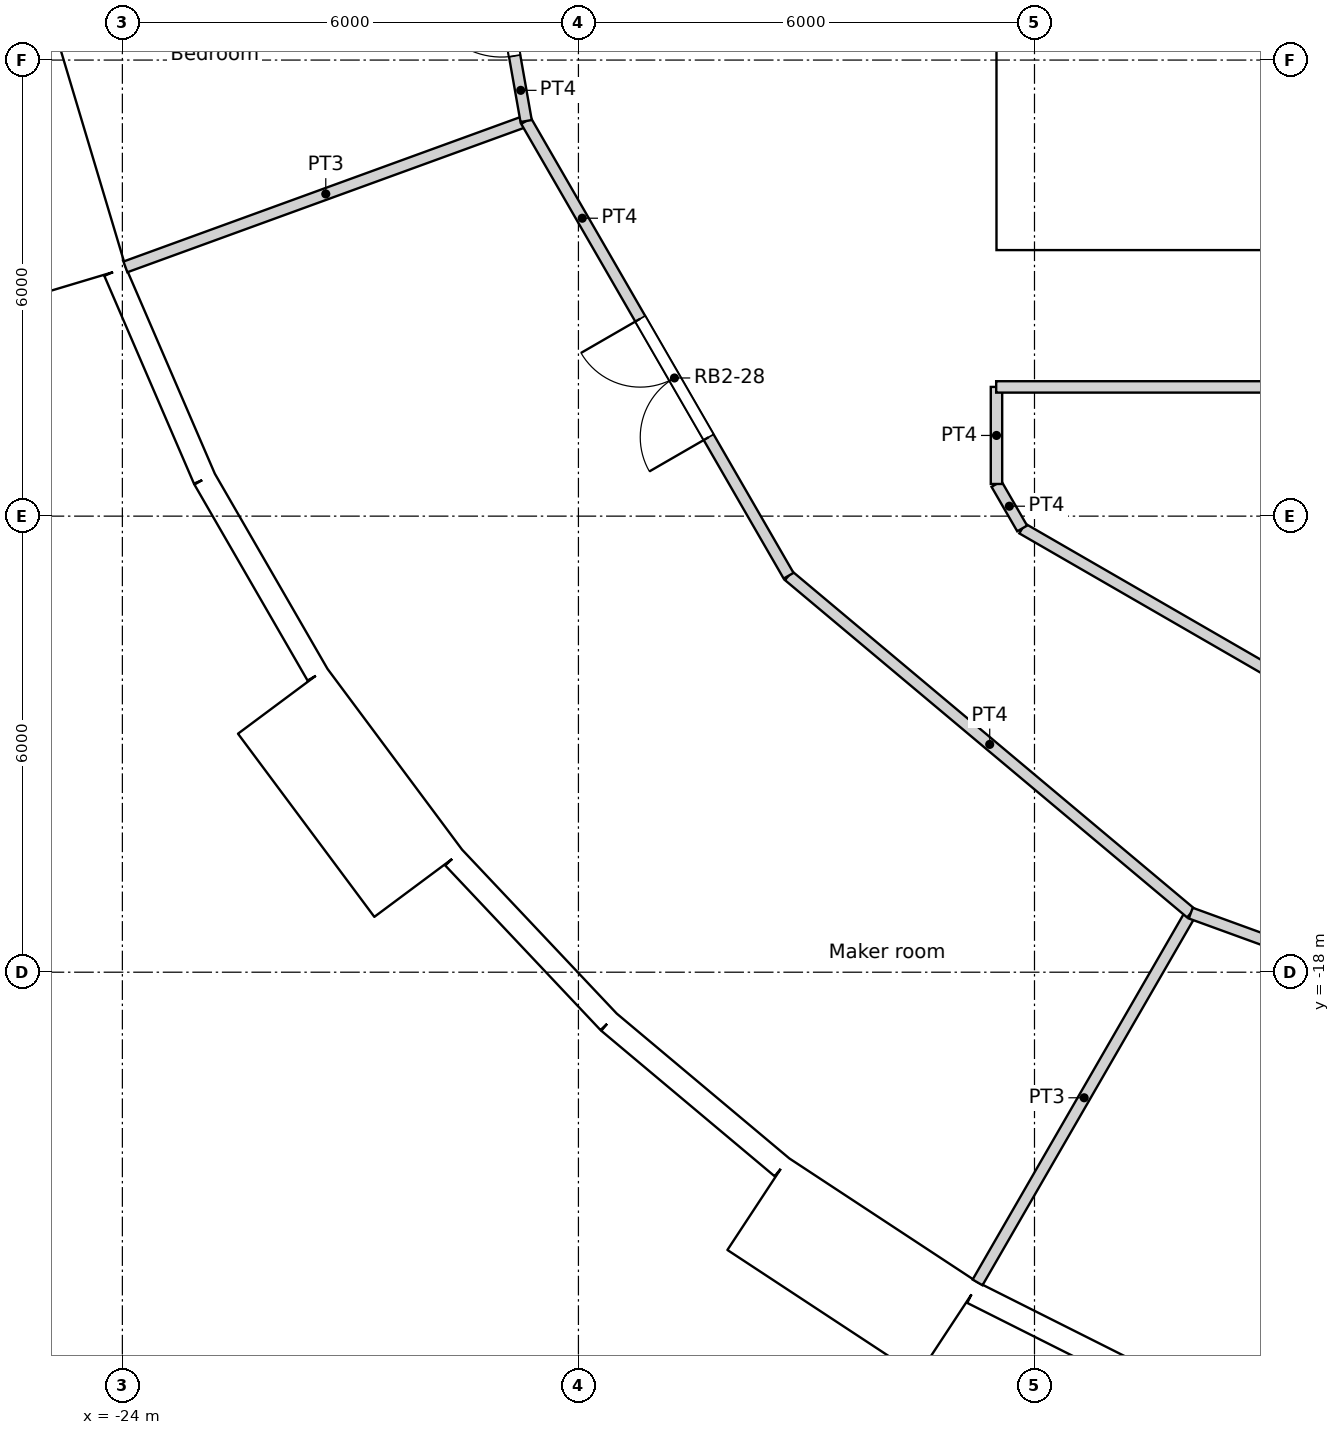
"""IFC4 building model, lengths in metres.
Left out: names, types, materials, properties, quantities, classifications, styles, units other than length and angle.
Written with IfcOpenShell. Run it as: python <this file> out.ifc"""

import sys

from ifc_helpers import new_model, si_unit, direction, frame, frame_2d, origin, origin_2d, place, context, subcontext, project, spatial, rectangle, circle, extrude, element, fill, save


model = new_model("IFC4")
c1 = context("Model", 3, precision=1e-05, world=origin(), true_north=direction((0.0, 1.0)))
c2 = subcontext(c1, "Body", "Model", "MODEL_VIEW")
j1 = project(units=[si_unit("LENGTHUNIT", "METRE"), si_unit("PLANEANGLEUNIT", "RADIAN")], contexts=[c1])
p1 = place(None, origin())
s1 = spatial("IfcSite", under=j1, at=p1, CompositionType="ELEMENT")
p2 = place(p1, origin())
s2 = spatial("IfcBuilding", under=s1, at=p2, CompositionType="ELEMENT")
p3 = place(p2, frame((0.0, 0.0, 136.8)))
s3 = spatial("IfcBuildingStorey", under=s2, at=p3, CompositionType="ELEMENT", Elevation=136.8)
for number, where, z_axis, x_axis in (
    (1, (-23.067, -8.396, 0.0), (0.0, 0.0, 1.0), (1.0, 0.0, 0.0)),
    (2, (-20.509, -13.489, 0.0), (0.0, 0.0, 1.0), (1.0, 0.0, 0.0)),
    (3, (-16.846, -17.855, 0.0), (0.0, 0.0, 1.0), (1.0, 0.0, 0.0)),
    (4, (-12.274, -21.259, 0.0), (0.0, 0.0, 1.0), (1.0, 0.0, 0.0)),
):
    element("IfcColumn", number, at=place(p3, frame(where, z_axis=z_axis, x_axis=x_axis)), inside=s3, PredefinedType="COLUMN", context=c2, shape_type="SweptSolid", body=[
        extrude(circle(Radius=0.6, at=origin_2d()), origin(), (0.0, 0.0, 1.0), 3.6),
    ])
for number, where, z_axis, x_axis in (
    (5, (-16.958, -8.167, 0.0), (0.0, 0.0, 1.0), (1.0, 0.0, 0.0)),
    (6, (-13.798, -12.802, 0.0), (0.0, 0.0, 1.0), (1.0, 0.0, 0.0)),
    (7, (-9.411, -16.301, 0.0), (0.0, 0.0, 1.0), (1.0, 0.0, 0.0)),
):
    element("IfcColumn", number, at=place(p3, frame(where, z_axis=z_axis, x_axis=x_axis)), inside=s3, PredefinedType="COLUMN", context=c2, shape_type="SweptSolid", body=[
        extrude(circle(Radius=0.65, at=origin_2d()), origin(), (0.0, 0.0, 1.0), 3.6),
    ])
p4 = place(p3, frame((-25.474, -2.978, 0.0), z_axis=(0.0, 0.0, 1.0), x_axis=(0.173686952598, -0.984800915159, 0.0)))
e8 = element("IfcWall", 8, at=p4, inside=s3, PredefinedType="SOLIDWALL", context=c2, shape_type="SweptSolid", body=[
    extrude(rectangle(XDim=2.973, YDim=0.3, at=frame_2d((1.486, 0.0))), origin(), (0.0, 0.0, 1.0), 3.3),
])
p5 = place(p4, frame((1.486, 0.0, 1.55)))
e9 = element("IfcOpeningElement", 9, at=p5, cuts=e8, PredefinedType="OPENING", context=c2, shape_type="SweptSolid", body=[
    extrude(circle(Radius=0.9, at=origin_2d()), frame((0.0, 0.16, 0.0), z_axis=(0.0, -1.0, 0.0), x_axis=(1.0, 0.0, 0.0)), (0.0, 0.0, 1.0), 0.32),
])
p6 = place(p3, frame((-25.51, -6.071, -0.3), z_axis=(0.0, 0.0, 1.0), x_axis=(0.286780420304, -0.957996341606, 0.0)))
e10 = element("IfcWall", 10, at=p6, inside=s3, PredefinedType="ELEMENTEDWALL", context=c2, shape_type="SweptSolid", body=[
    extrude(rectangle(XDim=3.0, YDim=1.45, at=frame_2d((1.5, 0.0))), origin(), (0.0, 0.0, 1.0), 3.6),
])
p7 = place(p6, frame((1.5, 0.0, 1.85)))
e11 = element("IfcOpeningElement", 11, at=p7, cuts=e10, PredefinedType="OPENING", context=c2, shape_type="SweptSolid", body=[
    extrude(circle(Radius=0.9, at=origin_2d()), frame((0.0, 0.735, 0.0), z_axis=(0.0, -1.0, 0.0), x_axis=(1.0, 0.0, 0.0)), (0.0, 0.0, 1.0), 1.47),
])
p8 = place(p3, frame((-24.097, -8.781, 0.0), z_axis=(0.0, 0.0, 1.0), x_axis=(0.396078892785, -0.918216483565, 0.0)))
e12 = element("IfcWall", 12, at=p8, inside=s3, PredefinedType="SOLIDWALL", context=c2, shape_type="SweptSolid", body=[
    extrude(rectangle(XDim=2.973, YDim=0.3, at=frame_2d((1.486, 0.0))), origin(), (0.0, 0.0, 1.0), 2.8),
])
p9 = place(p8, frame((1.486, 0.0, 1.55)))
e13 = element("IfcOpeningElement", 13, at=p9, cuts=e12, PredefinedType="OPENING", context=c2, shape_type="SweptSolid", body=[
    extrude(circle(Radius=0.9, at=origin_2d()), frame((0.0, 0.16, 0.0), z_axis=(0.0, -1.0, 0.0), x_axis=(1.0, 0.0, 0.0)), (0.0, 0.0, 1.0), 0.32),
])
p10 = place(p3, frame((-22.919, -11.51, 0.0), z_axis=(0.0, 0.0, 1.0), x_axis=(0.500016263033, -0.866016014115, 0.0)))
e14 = element("IfcWall", 14, at=p10, inside=s3, PredefinedType="SOLIDWALL", context=c2, shape_type="SweptSolid", body=[
    extrude(rectangle(XDim=2.973, YDim=0.3, at=frame_2d((1.487, 0.0))), origin(), (0.0, 0.0, 1.0), 3.3),
])
p11 = place(p10, frame((1.486, 0.0, 1.55)))
e15 = element("IfcOpeningElement", 15, at=p11, cuts=e14, PredefinedType="OPENING", context=c2, shape_type="SweptSolid", body=[
    extrude(circle(Radius=0.9, at=origin_2d()), frame((0.0, 0.16, 0.0), z_axis=(0.0, -1.0, 0.0), x_axis=(1.0, 0.0, 0.0)), (0.0, 0.0, 1.0), 0.32),
])
p12 = place(p3, frame((-21.895, -14.43, -0.3), z_axis=(0.0, 0.0, 1.0), x_axis=(0.597183717734, -0.802104486506, 0.0)))
e16 = element("IfcWall", 16, at=p12, inside=s3, PredefinedType="ELEMENTEDWALL", context=c2, shape_type="SweptSolid", body=[
    extrude(rectangle(XDim=3.0, YDim=1.45, at=frame_2d((1.5, 0.0))), origin(), (0.0, 0.0, 1.0), 3.6),
])
p13 = place(p12, frame((1.5, 0.0, 1.85)))
e17 = element("IfcOpeningElement", 17, at=p13, cuts=e16, PredefinedType="OPENING", context=c2, shape_type="SweptSolid", body=[
    extrude(circle(Radius=0.9, at=origin_2d()), frame((0.0, 0.735, 0.0), z_axis=(0.0, -1.0, 0.0), x_axis=(1.0, 0.0, 0.0)), (0.0, 0.0, 1.0), 1.47),
])
p14 = place(p3, frame((-19.64, -16.493, 0.0), z_axis=(0.0, 0.0, 1.0), x_axis=(0.686235184166, -0.727379730273, 0.0)))
e18 = element("IfcWall", 18, at=p14, inside=s3, PredefinedType="SOLIDWALL", context=c2, shape_type="SweptSolid", body=[
    extrude(rectangle(XDim=2.973, YDim=0.3, at=frame_2d((1.486, 0.0))), origin(), (0.0, 0.0, 1.0), 2.8),
])
p15 = place(p14, frame((1.486, 0.0, 1.55)))
e19 = element("IfcOpeningElement", 19, at=p15, cuts=e18, PredefinedType="OPENING", context=c2, shape_type="SweptSolid", body=[
    extrude(circle(Radius=0.9, at=origin_2d()), frame((0.0, 0.16, 0.0), z_axis=(0.0, -1.0, 0.0), x_axis=(1.0, 0.0, 0.0)), (0.0, 0.0, 1.0), 0.32),
])
p16 = place(p3, frame((-17.6, -18.655, 0.0), z_axis=(0.0, 0.0, 1.0), x_axis=(0.766049350637, -0.642781761089, 0.0)))
e20 = element("IfcWall", 20, at=p16, inside=s3, PredefinedType="SOLIDWALL", context=c2, shape_type="SweptSolid", body=[
    extrude(rectangle(XDim=2.973, YDim=0.3, at=frame_2d((1.486, 0.0))), origin(), (0.0, 0.0, 1.0), 3.3),
])
p17 = place(p16, frame((1.486, 0.0, 1.55)))
e21 = element("IfcOpeningElement", 21, at=p17, cuts=e20, PredefinedType="OPENING", context=c2, shape_type="SweptSolid", body=[
    extrude(circle(Radius=0.9, at=origin_2d()), frame((0.0, 0.16, 0.0), z_axis=(0.0, -1.0, 0.0), x_axis=(1.0, 0.0, 0.0)), (0.0, 0.0, 1.0), 0.32),
])
p18 = place(p3, frame((-15.639, -21.048, -0.3), z_axis=(0.0, 0.0, 1.0), x_axis=(0.835514416706, -0.549468524554, 0.0)))
e22 = element("IfcWall", 22, at=p18, inside=s3, PredefinedType="ELEMENTEDWALL", context=c2, shape_type="SweptSolid", body=[
    extrude(rectangle(XDim=3.0, YDim=1.45, at=frame_2d((1.5, 0.0))), origin(), (0.0, 0.0, 1.0), 3.6),
])
p19 = place(p18, frame((1.5, 0.0, 1.85)))
e23 = element("IfcOpeningElement", 23, at=p19, cuts=e22, PredefinedType="OPENING", context=c2, shape_type="SweptSolid", body=[
    extrude(circle(Radius=0.9, at=origin_2d()), frame((0.0, 0.735, 0.0), z_axis=(0.0, -1.0, 0.0), x_axis=(1.0, 0.0, 0.0)), (0.0, 0.0, 1.0), 1.47),
])
p20 = place(p3, frame((-12.815, -22.216, 0.0), z_axis=(0.0, 0.0, 1.0), x_axis=(0.893637442555, -0.448789618045, 0.0)))
e24 = element("IfcWall", 24, at=p20, inside=s3, PredefinedType="SOLIDWALL", context=c2, shape_type="SweptSolid", body=[
    extrude(rectangle(XDim=2.973, YDim=0.3, at=frame_2d((1.486, 0.0))), origin(), (0.0, 0.0, 1.0), 2.8),
])
p21 = place(p20, frame((1.486, 0.0, 1.55)))
e25 = element("IfcOpeningElement", 25, at=p21, cuts=e24, PredefinedType="OPENING", context=c2, shape_type="SweptSolid", body=[
    extrude(circle(Radius=0.9, at=origin_2d()), frame((0.0, 0.16, 0.0), z_axis=(0.0, -1.0, 0.0), x_axis=(1.0, 0.0, 0.0)), (0.0, 0.0, 1.0), 0.32),
])
p22 = place(p3, frame((-12.5, -8.05, 0.0), z_axis=(0.0, 0.0, 1.0), x_axis=(1.0, 0.0, 0.0)))
e26 = element("IfcWall", 26, at=p22, inside=s3, PredefinedType="SOLIDWALL", context=c2, shape_type="SweptSolid", body=[
    extrude(rectangle(XDim=25.0, YDim=0.9, at=frame_2d((12.5, 0.0))), origin(), (0.0, 0.0, 1.0), 3.6),
])
p23 = place(p22, frame((13.4, 0.0, 0.0)))
e27 = element("IfcOpeningElement", 27, at=p23, cuts=e26, PredefinedType="OPENING", context=c2, shape_type="SweptSolid", body=[
    extrude(rectangle(XDim=1.0, YDim=2.1, at=frame_2d((0.5, 1.05))), frame((0.0, 0.45, 0.0), z_axis=(0.0, -1.0, 0.0), x_axis=(1.0, 0.0, 0.0)), (0.0, 0.0, 1.0), 0.9),
])
p24 = place(p22, frame((8.3, 0.0, 0.0)))
e28 = element("IfcOpeningElement", 28, at=p24, cuts=e26, PredefinedType="OPENING", context=c2, shape_type="SweptSolid", body=[
    extrude(rectangle(XDim=1.8, YDim=2.1, at=frame_2d((0.9, 1.05))), frame((0.0, 0.45, 0.0), z_axis=(0.0, -1.0, 0.0), x_axis=(1.0, 0.0, 0.0)), (0.0, 0.0, 1.0), 0.9),
])
p25 = place(p22, frame((14.9, 0.0, 0.0)))
e29 = element("IfcOpeningElement", 29, at=p25, cuts=e26, PredefinedType="OPENING", context=c2, shape_type="SweptSolid", body=[
    extrude(rectangle(XDim=1.8, YDim=2.1, at=frame_2d((0.9, 1.05))), frame((0.0, 0.45, 0.0), z_axis=(0.0, -1.0, 0.0), x_axis=(1.0, 0.0, 0.0)), (0.0, 0.0, 1.0), 0.9),
])
p26 = place(p3, frame((-12.05, -7.6, 0.0), z_axis=(0.0, 0.0, 1.0), x_axis=(0.0, 1.0, 0.0)))
e30 = element("IfcWall", 30, at=p26, inside=s3, PredefinedType="SOLIDWALL", context=c2, shape_type="SweptSolid", body=[
    extrude(rectangle(XDim=15.2, YDim=0.9, at=frame_2d((7.6, 0.0))), origin(), (0.0, 0.0, 1.0), 3.6),
])
p27 = place(p26, frame((7.1, 0.0, 0.0)))
e31 = element("IfcOpeningElement", 31, at=p27, cuts=e30, PredefinedType="OPENING", context=c2, shape_type="SweptSolid", body=[
    extrude(rectangle(XDim=1.0, YDim=2.1, at=frame_2d((0.5, 1.05))), frame((0.0, 0.45, 0.0), z_axis=(0.0, -1.0, 0.0), x_axis=(1.0, 0.0, 0.0)), (0.0, 0.0, 1.0), 0.9),
])
p28 = place(p3, frame((-9.05, -7.0, 0.0), z_axis=(0.0, 0.0, 1.0), x_axis=(0.0, 1.0, 0.0)))
e32 = element("IfcWall", 32, at=p28, inside=s3, PredefinedType="SOLIDWALL", context=c2, shape_type="SweptSolid", body=[
    extrude(rectangle(XDim=14.6, YDim=0.3, at=frame_2d((7.3, 0.0))), origin(), (0.0, 0.0, 1.0), 3.3),
])
p29 = place(p3, frame((-9.05, -7.15, 0.0), z_axis=(0.0, 0.0, 1.0), x_axis=(1.0, 0.0, 0.0)))
e33 = element("IfcWall", 33, at=p29, inside=s3, PredefinedType="SOLIDWALL", context=c2, shape_type="SweptSolid", body=[
    extrude(rectangle(XDim=4.85, YDim=0.9, at=frame_2d((2.425, 0.0))), origin(), (0.0, 0.0, 1.0), 3.3),
])
p30 = place(p3, frame((-12.504, -10.3, 0.0), z_axis=(0.0, 0.0, 1.0), x_axis=(1.0, 0.0, 0.0)))
e34 = element("IfcWall", 34, at=p30, inside=s3, PredefinedType="PARTITIONING", context=c2, shape_type="SweptSolid", body=[
    extrude(rectangle(XDim=7.687, YDim=0.15, at=frame_2d((3.844, 0.0))), origin(), (0.0, 0.0, 1.0), 3.3),
])
p31 = place(p3, frame((-12.5, -11.577, 0.0), z_axis=(0.0, 0.0, 1.0), x_axis=(0.0, 1.0, 0.0)))
e35 = element("IfcWall", 35, at=p31, inside=s3, PredefinedType="PARTITIONING", context=c2, shape_type="SweptSolid", body=[
    extrude(rectangle(XDim=1.277, YDim=0.15, at=frame_2d((0.638, 0.0))), origin(), (0.0, 0.0, 1.0), 3.3),
])
p32 = place(p3, frame((-12.5, -11.577, 0.0), z_axis=(0.0, 0.0, 1.0), x_axis=(0.500024767483, -0.866011103799, 0.0)))
e36 = element("IfcWall", 36, at=p32, inside=s3, PredefinedType="PARTITIONING", context=c2, shape_type="SweptSolid", body=[
    extrude(rectangle(XDim=0.676, YDim=0.15, at=frame_2d((0.338, 0.0))), origin(), (0.0, 0.0, 1.0), 3.3),
])
p33 = place(p3, frame((-19.164, -4.104, 0.0), z_axis=(0.0, 0.0, 1.0), x_axis=(0.173770083029, -0.984786250028, 0.0)))
e37 = element("IfcWall", 37, at=p33, inside=s3, PredefinedType="PARTITIONING", context=c2, shape_type="SweptSolid", body=[
    extrude(rectangle(XDim=2.74, YDim=0.15, at=frame_2d((1.37, 0.0))), origin(), (0.0, 0.0, 1.0), 3.3),
])
p34 = place(p33, frame((0.87, 0.0, 0.0)))
e38 = element("IfcOpeningElement", 38, at=p34, cuts=e37, PredefinedType="OPENING", context=c2, shape_type="SweptSolid", body=[
    extrude(rectangle(XDim=1.0, YDim=2.1, at=frame_2d((0.5, 1.05))), frame((0.0, 0.075, 0.0), z_axis=(0.0, -1.0, 0.0), x_axis=(1.0, 0.0, 0.0)), (0.0, 0.0, 1.0), 0.15),
])
p35 = place(p3, frame((-15.235, -12.784, 0.0), z_axis=(0.0, 0.0, 1.0), x_axis=(0.766192104565, -0.642611592567, 0.0)))
e39 = element("IfcWall", 39, at=p35, inside=s3, PredefinedType="PARTITIONING", context=c2, shape_type="SweptSolid", body=[
    extrude(rectangle(XDim=6.906, YDim=0.15, at=frame_2d((3.453, 0.0))), origin(), (0.0, 0.0, 1.0), 3.3),
])
p36 = place(p3, frame((-18.688, -6.802, 0.0), z_axis=(0.0, 0.0, 1.0), x_axis=(0.499914202267, -0.866074933462, 0.0)))
e40 = element("IfcWall", 40, at=p36, inside=s3, PredefinedType="PARTITIONING", context=c2, shape_type="SweptSolid", body=[
    extrude(rectangle(XDim=6.907, YDim=0.15, at=frame_2d((3.454, 0.0))), origin(), (0.0, 0.0, 1.0), 3.3),
])
p37 = place(p36, frame((3.003, 0.0, 0.0)))
e41 = element("IfcOpeningElement", 41, at=p37, cuts=e40, PredefinedType="OPENING", context=c2, shape_type="SweptSolid", body=[
    extrude(rectangle(XDim=1.8, YDim=2.1, at=frame_2d((0.9, 1.05))), frame((0.0, 0.075, 0.0), z_axis=(0.0, -1.0, 0.0), x_axis=(1.0, 0.0, 0.0)), (0.0, 0.0, 1.0), 0.15),
])
p38 = place(p3, frame((-12.162, -12.162, 0.0), z_axis=(0.0, 0.0, 1.0), x_axis=(0.866004766557, -0.500035743023, 0.0)))
e42 = element("IfcWall", 42, at=p38, inside=s3, PredefinedType="PARTITIONING", context=c2, shape_type="SweptSolid", body=[
    extrude(rectangle(XDim=8.477, YDim=0.15, at=frame_2d((4.239, 0.0))), origin(), (0.0, 0.0, 1.0), 3.3),
])
p39 = place(p38, frame((3.738, 0.0, 0.0)))
e43 = element("IfcOpeningElement", 43, at=p39, cuts=e42, PredefinedType="OPENING", context=c2, shape_type="SweptSolid", body=[
    extrude(rectangle(XDim=1.0, YDim=2.04, at=frame_2d((0.5, 1.02))), frame((0.0, 0.075, 0.0), z_axis=(0.0, -1.0, 0.0), x_axis=(1.0, 0.0, 0.0)), (0.0, 0.0, 1.0), 0.15),
])
p40 = place(p3, frame((-9.944, -17.223, 0.0), z_axis=(0.0, 0.0, 1.0), x_axis=(0.939672634566, -0.342075050021, 0.0)))
e44 = element("IfcWall", 44, at=p40, inside=s3, PredefinedType="PARTITIONING", context=c2, shape_type="SweptSolid", body=[
    extrude(rectangle(XDim=6.908, YDim=0.15, at=frame_2d((3.454, 0.0))), origin(), (0.0, 0.0, 1.0), 3.3),
])
p41 = place(p40, frame((2.954, 0.0, 0.0)))
e45 = element("IfcOpeningElement", 45, at=p41, cuts=e44, PredefinedType="OPENING", context=c2, shape_type="SweptSolid", body=[
    extrude(rectangle(XDim=1.0, YDim=2.04, at=frame_2d((0.5, 1.02))), frame((0.0, 0.075, 0.0), z_axis=(0.0, -1.0, 0.0), x_axis=(1.0, 0.0, 0.0)), (0.0, 0.0, 1.0), 0.15),
])
p42 = place(p3, frame((-23.96, -8.721, 0.0), z_axis=(0.0, 0.0, 1.0), x_axis=(0.939686652043, 0.342036541866, 0.0)))
e46 = element("IfcWall", 46, at=p42, inside=s3, PredefinedType="PARTITIONING", context=c2, shape_type="SweptSolid", body=[
    extrude(rectangle(XDim=5.61, YDim=0.15, at=frame_2d((2.805, 0.0))), origin(), (0.0, 0.0, 1.0), 3.3),
])
p43 = place(p3, frame((-12.749, -22.081, 0.0), z_axis=(0.0, 0.0, 1.0), x_axis=(0.500010020406, 0.866019618423, 0.0)))
e47 = element("IfcWall", 47, at=p43, inside=s3, PredefinedType="PARTITIONING", context=c2, shape_type="SweptSolid", body=[
    extrude(rectangle(XDim=5.61, YDim=0.15, at=frame_2d((2.805, 0.0))), origin(), (0.0, 0.0, 1.0), 3.3),
])
p44 = place(p7, origin())
e48 = element("IfcWindow", 48, at=p44, inside=s3, PartitioningType="SINGLE_PANEL", PredefinedType="WINDOW", context=c2, shape_type="SweptSolid", body=[
    extrude(circle(Radius=0.9, at=origin_2d()), frame((0.0, 0.695, 0.0), z_axis=(0.0, -1.0, 0.0), x_axis=(1.0, 0.0, 0.0)), (0.0, 0.0, 1.0), 0.1),
])
fill(e11, e48)
p45 = place(p9, origin())
e49 = element("IfcWindow", 49, at=p45, inside=s3, PartitioningType="SINGLE_PANEL", PredefinedType="WINDOW", context=c2, shape_type="SweptSolid", body=[
    extrude(circle(Radius=0.9, at=origin_2d()), frame((0.0, 0.12, 0.0), z_axis=(0.0, -1.0, 0.0), x_axis=(1.0, 0.0, 0.0)), (0.0, 0.0, 1.0), 0.1),
])
fill(e13, e49)
p46 = place(p11, origin())
e50 = element("IfcWindow", 50, at=p46, inside=s3, PartitioningType="SINGLE_PANEL", PredefinedType="WINDOW", context=c2, shape_type="SweptSolid", body=[
    extrude(circle(Radius=0.9, at=origin_2d()), frame((0.0, 0.12, 0.0), z_axis=(0.0, -1.0, 0.0), x_axis=(1.0, 0.0, 0.0)), (0.0, 0.0, 1.0), 0.1),
])
fill(e15, e50)
p47 = place(p13, origin())
e51 = element("IfcWindow", 51, at=p47, inside=s3, PartitioningType="SINGLE_PANEL", PredefinedType="WINDOW", context=c2, shape_type="SweptSolid", body=[
    extrude(circle(Radius=0.9, at=origin_2d()), frame((0.0, 0.695, 0.0), z_axis=(0.0, -1.0, 0.0), x_axis=(1.0, 0.0, 0.0)), (0.0, 0.0, 1.0), 0.1),
])
fill(e17, e51)
p48 = place(p15, origin())
e52 = element("IfcWindow", 52, at=p48, inside=s3, PartitioningType="SINGLE_PANEL", PredefinedType="WINDOW", context=c2, shape_type="SweptSolid", body=[
    extrude(circle(Radius=0.9, at=origin_2d()), frame((0.0, 0.12, 0.0), z_axis=(0.0, -1.0, 0.0), x_axis=(1.0, 0.0, 0.0)), (0.0, 0.0, 1.0), 0.1),
])
fill(e19, e52)
p49 = place(p17, origin())
e53 = element("IfcWindow", 53, at=p49, inside=s3, PartitioningType="SINGLE_PANEL", PredefinedType="WINDOW", context=c2, shape_type="SweptSolid", body=[
    extrude(circle(Radius=0.9, at=origin_2d()), frame((0.0, 0.12, 0.0), z_axis=(0.0, -1.0, 0.0), x_axis=(1.0, 0.0, 0.0)), (0.0, 0.0, 1.0), 0.1),
])
fill(e21, e53)
p50 = place(p19, origin())
e54 = element("IfcWindow", 54, at=p50, inside=s3, PartitioningType="SINGLE_PANEL", PredefinedType="WINDOW", context=c2, shape_type="SweptSolid", body=[
    extrude(circle(Radius=0.9, at=origin_2d()), frame((0.0, 0.695, 0.0), z_axis=(0.0, -1.0, 0.0), x_axis=(1.0, 0.0, 0.0)), (0.0, 0.0, 1.0), 0.1),
])
fill(e23, e54)
p51 = place(p21, origin())
e55 = element("IfcWindow", 55, at=p51, inside=s3, PartitioningType="SINGLE_PANEL", PredefinedType="WINDOW", context=c2, shape_type="SweptSolid", body=[
    extrude(circle(Radius=0.9, at=origin_2d()), frame((0.0, 0.12, 0.0), z_axis=(0.0, -1.0, 0.0), x_axis=(1.0, 0.0, 0.0)), (0.0, 0.0, 1.0), 0.1),
])
fill(e25, e55)
p52 = place(p34, origin())
e56 = element("IfcDoor", 56, at=p52, inside=s3, OperationType="SINGLE_SWING_RIGHT", PredefinedType="DOOR", context=c2, shape_type="SweptSolid", body=[
    extrude(rectangle(XDim=1.0, YDim=2.1, at=frame_2d((0.5, 1.05))), frame((0.0, 0.025, 0.0), z_axis=(0.0, -1.0, 0.0), x_axis=(1.0, 0.0, 0.0)), (0.0, 0.0, 1.0), 0.05),
])
fill(e38, e56)
p53 = place(p37, origin())
e57 = element("IfcDoor", 57, at=p53, inside=s3, OperationType="DOUBLE_DOOR_SINGLE_SWING", PredefinedType="DOOR", context=c2, shape_type="SweptSolid", body=[
    extrude(rectangle(XDim=1.8, YDim=2.1, at=frame_2d((0.9, 1.05))), frame((0.0, 0.025, 0.0), z_axis=(0.0, -1.0, 0.0), x_axis=(1.0, 0.0, 0.0)), (0.0, 0.0, 1.0), 0.05),
])
fill(e41, e57)
save(model, sys.argv[1])
